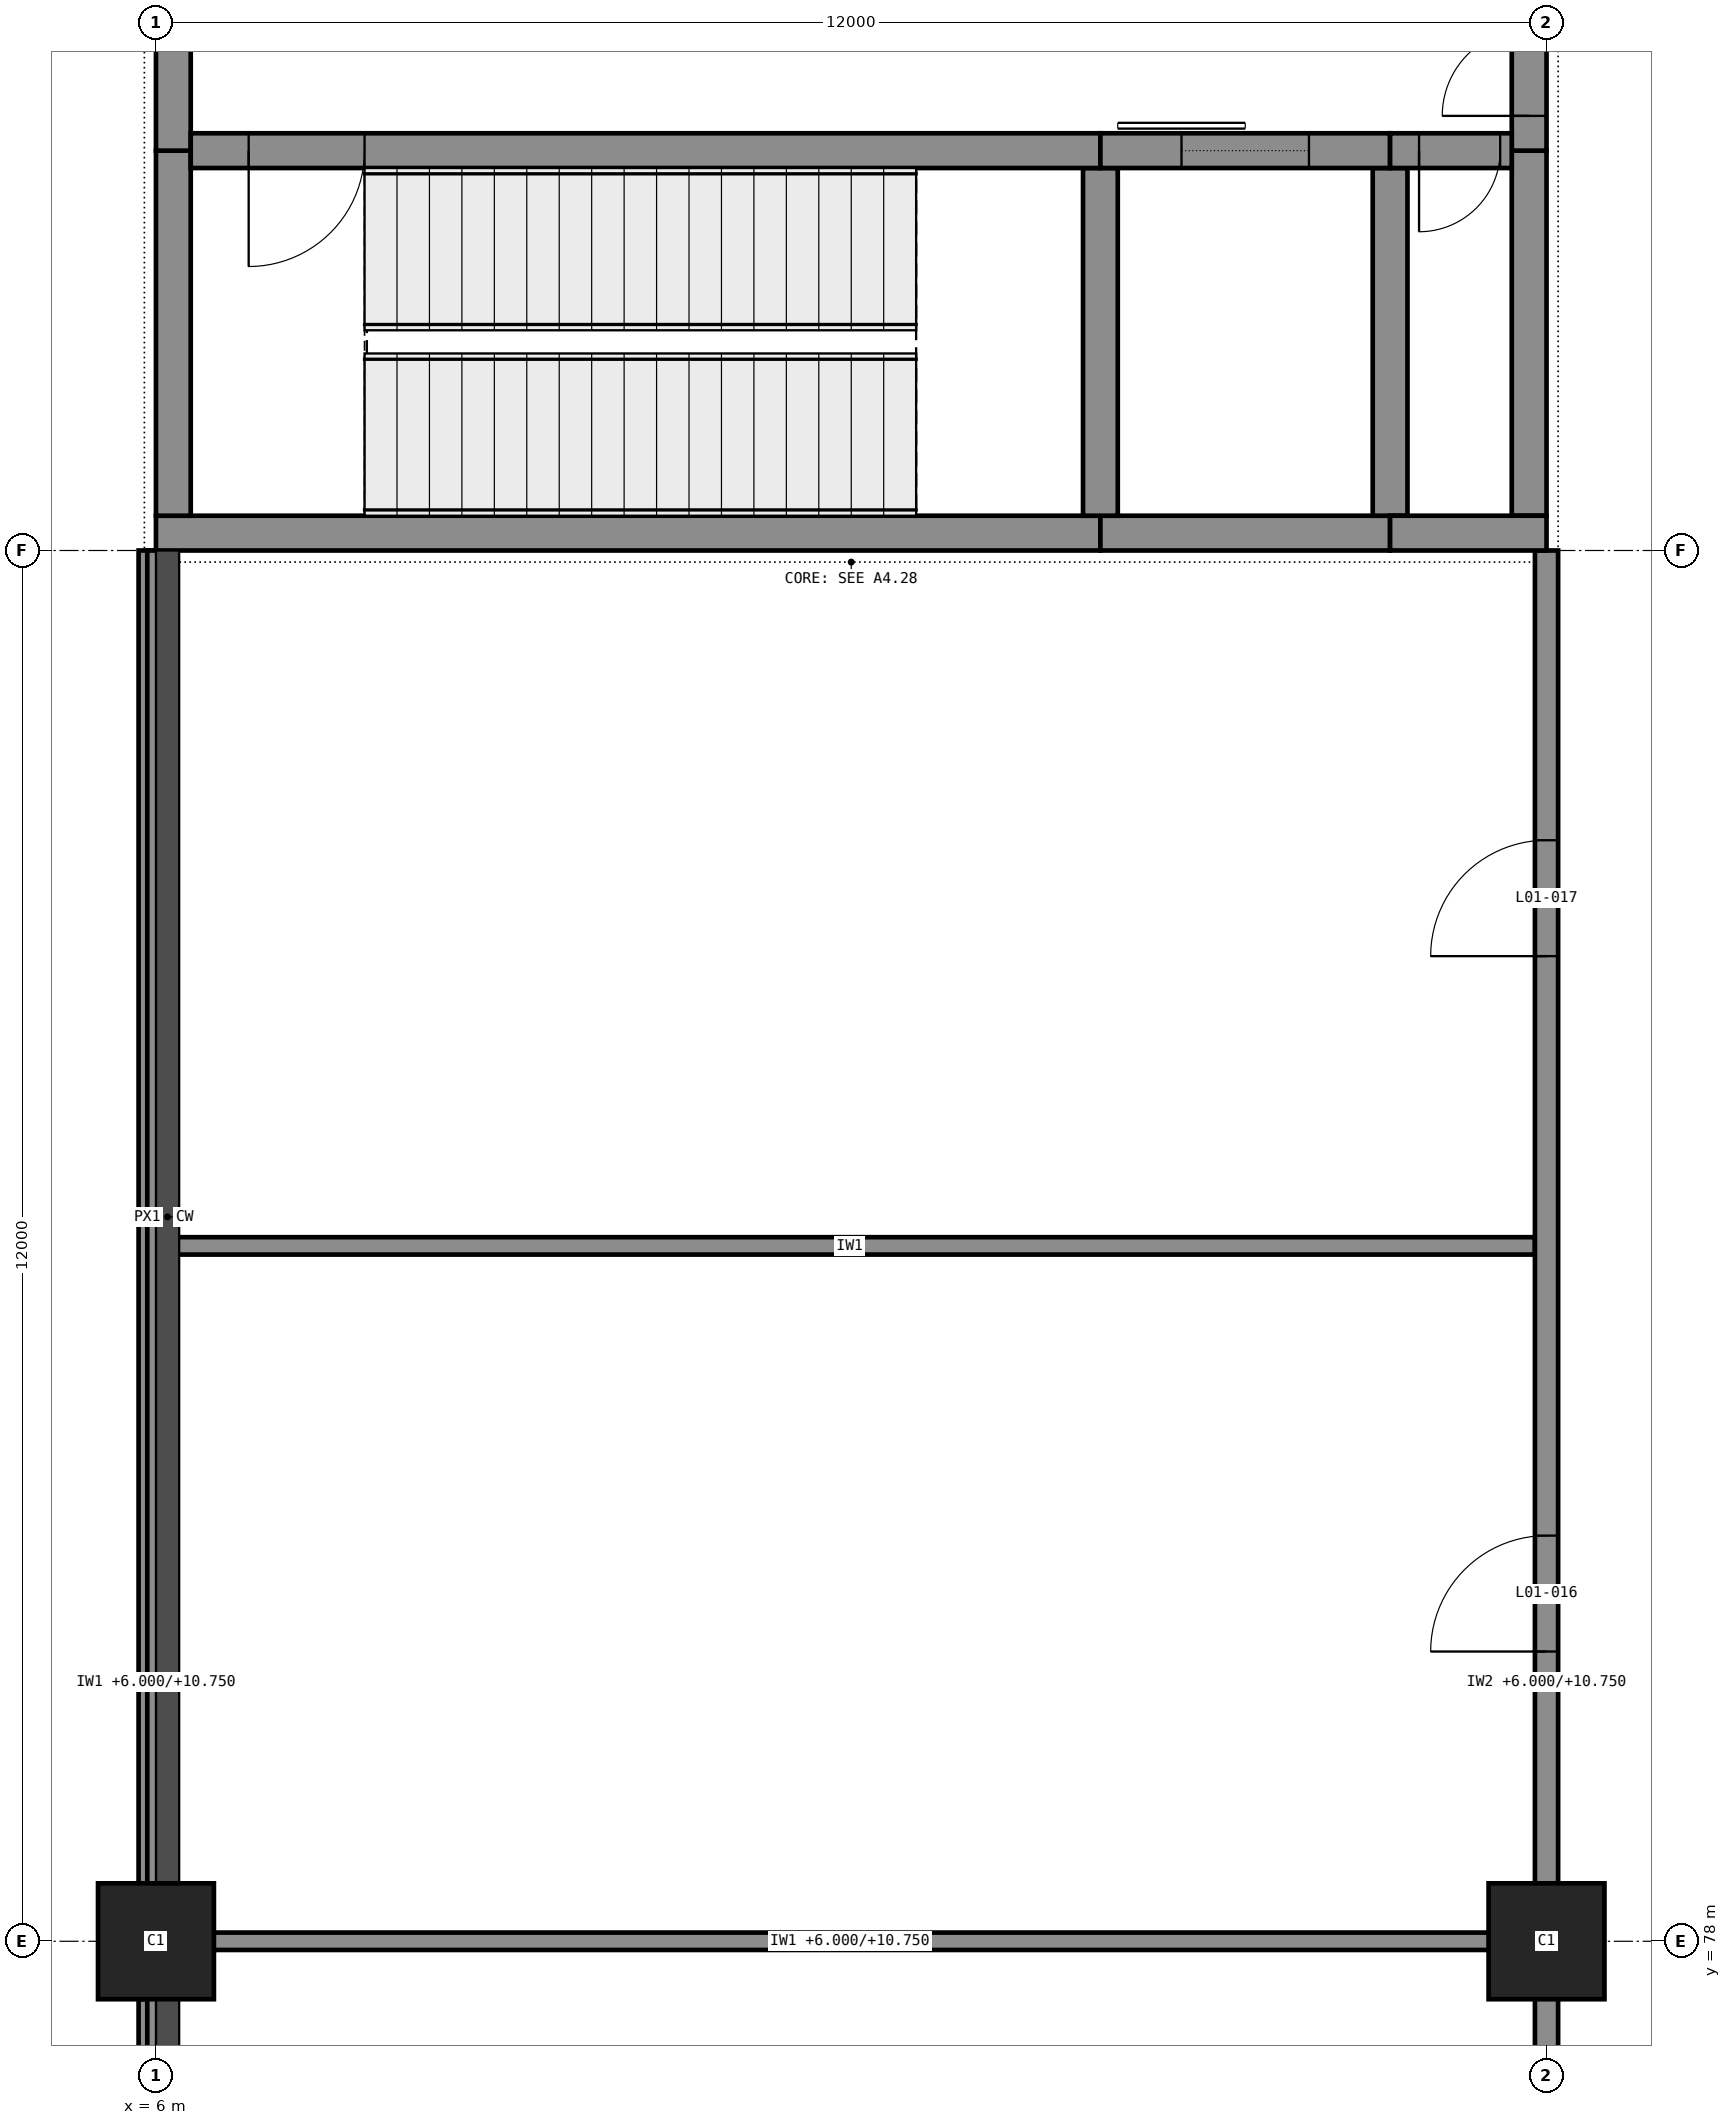
"""IFC4 building model, lengths in metres.
Left out: names, types, materials, properties, quantities, classifications, styles, units other than length and angle.
Written with IfcOpenShell. Run it as: python <this file> out.ifc"""

import sys

from ifc_helpers import new_model, si_unit, direction, frame, frame_2d, origin, origin_2d, place, context, subcontext, project, spatial, rectangle, extrude, element, fill, save


model = new_model("IFC4")
c1 = context("Model", 3, precision=1e-05, world=origin(), true_north=direction((0.0, 1.0)))
c2 = subcontext(c1, "Body", "Model", "MODEL_VIEW")
j1 = project(units=[si_unit("LENGTHUNIT", "METRE"), si_unit("PLANEANGLEUNIT", "RADIAN")], contexts=[c1])
p1 = place(None, origin())
s1 = spatial("IfcSite", under=j1, at=p1, CompositionType="ELEMENT")
p2 = place(p1, origin())
s2 = spatial("IfcBuilding", under=s1, at=p2, CompositionType="ELEMENT")
p3 = place(p2, frame((0.0, 0.0, 6.0)))
s3 = spatial("IfcBuildingStorey", under=s2, at=p3, CompositionType="ELEMENT", Elevation=6.0)
for number, where, z_axis, x_axis in (
    (1, (6.0, 78.0, 0.0), (0.0, 0.0, 1.0), (1.0, 0.0, 0.0)),
    (2, (18.0, 78.0, 0.0), (0.0, 0.0, 1.0), (1.0, 0.0, 0.0)),
):
    element("IfcColumn", number, at=place(p3, frame(where, z_axis=z_axis, x_axis=x_axis)), inside=s3, PredefinedType="COLUMN", context=c2, shape_type="SweptSolid", body=[
        extrude(rectangle(XDim=1.0, YDim=1.0, at=origin_2d()), origin(), (0.0, 0.0, 1.0), 6.0),
    ])
p4 = place(p3, frame((6.0, 90.15, 0.0), z_axis=(0.0, 0.0, 1.0), x_axis=(1.0, 0.0, 0.0)))
e3 = element("IfcWall", 3, at=p4, inside=s3, PredefinedType="SHEAR", context=c2, shape_type="SweptSolid", body=[
    extrude(rectangle(XDim=8.15, YDim=0.3, at=frame_2d((4.075, 0.0))), origin(), (0.0, 0.0, 1.0), 5.75),
])
p5 = place(p3, frame((14.15, 90.15, 0.0), z_axis=(0.0, 0.0, 1.0), x_axis=(1.0, 0.0, 0.0)))
e4 = element("IfcWall", 4, at=p5, inside=s3, PredefinedType="SHEAR", context=c2, shape_type="SweptSolid", body=[
    extrude(rectangle(XDim=2.5, YDim=0.3, at=frame_2d((1.25, 0.0))), origin(), (0.0, 0.0, 1.0), 5.75),
])
p6 = place(p3, frame((16.65, 90.15, 0.0), z_axis=(0.0, 0.0, 1.0), x_axis=(1.0, 0.0, 0.0)))
e5 = element("IfcWall", 5, at=p6, inside=s3, PredefinedType="SHEAR", context=c2, shape_type="SweptSolid", body=[
    extrude(rectangle(XDim=1.35, YDim=0.3, at=frame_2d((0.675, 0.0))), origin(), (0.0, 0.0, 1.0), 5.75),
])
p7 = place(p3, frame((6.3, 93.45, 0.0), z_axis=(0.0, 0.0, 1.0), x_axis=(1.0, 0.0, 0.0)))
e6 = element("IfcWall", 6, at=p7, inside=s3, PredefinedType="SHEAR", context=c2, shape_type="SweptSolid", body=[
    extrude(rectangle(XDim=7.85, YDim=0.3, at=frame_2d((3.925, 0.0))), origin(), (0.0, 0.0, 1.0), 5.75),
])
p8 = place(p7, frame((0.5, 0.0, 0.0)))
e7 = element("IfcOpeningElement", 7, at=p8, cuts=e6, PredefinedType="OPENING", context=c2, shape_type="SweptSolid", body=[
    extrude(rectangle(XDim=1.0, YDim=2.1, at=frame_2d((0.5, 1.05))), frame((0.0, 0.16, 0.0), z_axis=(0.0, -1.0, 0.0), x_axis=(1.0, 0.0, 0.0)), (0.0, 0.0, 1.0), 0.32),
])
p9 = place(p3, frame((14.15, 93.45, 0.0), z_axis=(0.0, 0.0, 1.0), x_axis=(1.0, 0.0, 0.0)))
e8 = element("IfcWall", 8, at=p9, inside=s3, PredefinedType="SHEAR", context=c2, shape_type="SweptSolid", body=[
    extrude(rectangle(XDim=2.5, YDim=0.3, at=frame_2d((1.25, 0.0))), origin(), (0.0, 0.0, 1.0), 5.75),
])
p10 = place(p9, frame((0.7, 0.0, 0.0)))
e9 = element("IfcOpeningElement", 9, at=p10, cuts=e8, PredefinedType="OPENING", context=c2, shape_type="SweptSolid", body=[
    extrude(rectangle(XDim=1.1, YDim=2.1, at=frame_2d((0.55, 1.05))), frame((0.0, 0.16, 0.0), z_axis=(0.0, -1.0, 0.0), x_axis=(1.0, 0.0, 0.0)), (0.0, 0.0, 1.0), 0.32),
])
p11 = place(p3, frame((16.65, 93.45, 0.0), z_axis=(0.0, 0.0, 1.0), x_axis=(1.0, 0.0, 0.0)))
e10 = element("IfcWall", 10, at=p11, inside=s3, PredefinedType="SHEAR", context=c2, shape_type="SweptSolid", body=[
    extrude(rectangle(XDim=1.05, YDim=0.3, at=frame_2d((0.525, 0.0))), origin(), (0.0, 0.0, 1.0), 5.75),
])
p12 = place(p11, frame((0.25, 0.0, 0.0)))
e11 = element("IfcOpeningElement", 11, at=p12, cuts=e10, PredefinedType="OPENING", context=c2, shape_type="SweptSolid", body=[
    extrude(rectangle(XDim=0.7, YDim=2.1, at=frame_2d((0.35, 1.05))), frame((0.0, 0.16, 0.0), z_axis=(0.0, -1.0, 0.0), x_axis=(1.0, 0.0, 0.0)), (0.0, 0.0, 1.0), 0.32),
])
p13 = place(p3, frame((6.15, 90.3, 0.0), z_axis=(0.0, 0.0, 1.0), x_axis=(0.0, 1.0, 0.0)))
e12 = element("IfcWall", 12, at=p13, inside=s3, PredefinedType="SHEAR", context=c2, shape_type="SweptSolid", body=[
    extrude(rectangle(XDim=3.15, YDim=0.3, at=frame_2d((1.575, 0.0))), origin(), (0.0, 0.0, 1.0), 5.75),
])
p14 = place(p3, frame((6.15, 93.45, 0.0), z_axis=(0.0, 0.0, 1.0), x_axis=(0.0, 1.0, 0.0)))
e13 = element("IfcWall", 13, at=p14, inside=s3, PredefinedType="SHEAR", context=c2, shape_type="SweptSolid", body=[
    extrude(rectangle(XDim=5.1, YDim=0.3, at=frame_2d((2.55, 0.0))), origin(), (0.0, 0.0, 1.0), 5.75),
])
p15 = place(p3, frame((17.85, 90.3, 0.0), z_axis=(0.0, 0.0, 1.0), x_axis=(0.0, 1.0, 0.0)))
e14 = element("IfcWall", 14, at=p15, inside=s3, PredefinedType="SHEAR", context=c2, shape_type="SweptSolid", body=[
    extrude(rectangle(XDim=3.15, YDim=0.3, at=frame_2d((1.575, 0.0))), origin(), (0.0, 0.0, 1.0), 5.75),
])
p16 = place(p3, frame((17.85, 93.45, 0.0), z_axis=(0.0, 0.0, 1.0), x_axis=(0.0, 1.0, 0.0)))
e15 = element("IfcWall", 15, at=p16, inside=s3, PredefinedType="SHEAR", context=c2, shape_type="SweptSolid", body=[
    extrude(rectangle(XDim=5.1, YDim=0.3, at=frame_2d((2.55, 0.0))), origin(), (0.0, 0.0, 1.0), 5.75),
])
p17 = place(p16, frame((0.3, 0.0, 0.0)))
e16 = element("IfcOpeningElement", 16, at=p17, cuts=e15, PredefinedType="OPENING", context=c2, shape_type="SweptSolid", body=[
    extrude(rectangle(XDim=1.5, YDim=2.1, at=frame_2d((0.75, 1.05))), frame((0.0, 0.16, 0.0), z_axis=(0.0, -1.0, 0.0), x_axis=(1.0, 0.0, 0.0)), (0.0, 0.0, 1.0), 0.32),
])
for number, where, z_axis, x_axis in (
    (17, (14.15, 90.3, 0.0), (0.0, 0.0, 1.0), (0.0, 1.0, 0.0)),
    (18, (16.65, 90.3, 0.0), (0.0, 0.0, 1.0), (0.0, 1.0, 0.0)),
):
    element("IfcWall", number, at=place(p3, frame(where, z_axis=z_axis, x_axis=x_axis)), inside=s3, PredefinedType="SHEAR", context=c2, shape_type="SweptSolid", body=[
        extrude(rectangle(XDim=3.0, YDim=0.3, at=frame_2d((1.5, 0.0))), origin(), (0.0, 0.0, 1.0), 5.75),
    ])
p18 = place(p3, frame((5.925, 90.0, 5.75), z_axis=(0.0, 0.0, 1.0), x_axis=(0.0, -1.0, 0.0)))
e19 = element("IfcWall", 19, at=p18, inside=s3, PredefinedType="STANDARD", context=c2, shape_type="SweptSolid", body=[
    extrude(rectangle(XDim=11.5, YDim=0.15, at=frame_2d((5.75, 0.0))), origin(), (0.0, 0.0, 1.0), 0.25),
])
p19 = place(p3, frame((5.925, 77.5, 5.75), z_axis=(0.0, 0.0, 1.0), x_axis=(0.0, -1.0, 0.0)))
e20 = element("IfcWall", 20, at=p19, inside=s3, PredefinedType="STANDARD", context=c2, shape_type="SweptSolid", body=[
    extrude(rectangle(XDim=11.0, YDim=0.15, at=frame_2d((5.5, 0.0))), origin(), (0.0, 0.0, 1.0), 0.25),
])
p20 = place(p3, frame((6.075, 78.0, 0.0), z_axis=(0.0, 0.0, 1.0), x_axis=(1.0, 0.0, 0.0)))
e21 = element("IfcWall", 21, at=p20, inside=s3, PredefinedType="PARTITIONING", context=c2, shape_type="SweptSolid", body=[
    extrude(rectangle(XDim=11.825, YDim=0.15, at=frame_2d((5.913, 0.0))), origin(), (0.0, 0.0, 1.0), 4.75),
])
p21 = place(p3, frame((6.075, 84.0, 0.0), z_axis=(0.0, 0.0, 1.0), x_axis=(1.0, 0.0, 0.0)))
e22 = element("IfcWall", 22, at=p21, inside=s3, PredefinedType="PARTITIONING", context=c2, shape_type="SweptSolid", body=[
    extrude(rectangle(XDim=11.825, YDim=0.15, at=frame_2d((5.913, 0.0))), origin(), (0.0, 0.0, 1.0), 5.75),
])
p22 = place(p3, frame((6.0, 66.1, 0.0), z_axis=(0.0, 0.0, 1.0), x_axis=(0.0, 1.0, 0.0)))
e23 = element("IfcWall", 23, at=p22, inside=s3, PredefinedType="PARTITIONING", context=c2, shape_type="SweptSolid", body=[
    extrude(rectangle(XDim=23.9, YDim=0.15, at=frame_2d((11.95, 0.0))), origin(), (0.0, 0.0, 1.0), 4.75),
])
p23 = place(p3, frame((18.0, 54.0, 0.0), z_axis=(0.0, 0.0, 1.0), x_axis=(0.0, 1.0, 0.0)))
e24 = element("IfcWall", 24, at=p23, inside=s3, PredefinedType="PARTITIONING", context=c2, shape_type="SweptSolid", body=[
    extrude(rectangle(XDim=36.0, YDim=0.2, at=frame_2d((18.0, 0.0))), origin(), (0.0, 0.0, 1.0), 4.75),
])
p24 = place(p23, frame((2.5, 0.0, 0.0)))
e25 = element("IfcOpeningElement", 25, at=p24, cuts=e24, PredefinedType="OPENING", context=c2, shape_type="SweptSolid", body=[
    extrude(rectangle(XDim=1.0, YDim=2.1, at=frame_2d((0.5, 1.05))), frame((0.0, 0.11, 0.0), z_axis=(0.0, -1.0, 0.0), x_axis=(1.0, 0.0, 0.0)), (0.0, 0.0, 1.0), 0.22),
])
p25 = place(p23, frame((7.2, 0.0, 0.0)))
e26 = element("IfcOpeningElement", 26, at=p25, cuts=e24, PredefinedType="OPENING", context=c2, shape_type="SweptSolid", body=[
    extrude(rectangle(XDim=1.2, YDim=2.1, at=frame_2d((0.6, 1.05))), frame((0.0, 0.11, 0.0), z_axis=(0.0, -1.0, 0.0), x_axis=(1.0, 0.0, 0.0)), (0.0, 0.0, 1.0), 0.22),
])
p26 = place(p23, frame((14.5, 0.0, 0.0)))
e27 = element("IfcOpeningElement", 27, at=p26, cuts=e24, PredefinedType="OPENING", context=c2, shape_type="SweptSolid", body=[
    extrude(rectangle(XDim=1.0, YDim=2.1, at=frame_2d((0.5, 1.05))), frame((0.0, 0.11, 0.0), z_axis=(0.0, -1.0, 0.0), x_axis=(1.0, 0.0, 0.0)), (0.0, 0.0, 1.0), 0.22),
])
p27 = place(p23, frame((20.5, 0.0, 0.0)))
e28 = element("IfcOpeningElement", 28, at=p27, cuts=e24, PredefinedType="OPENING", context=c2, shape_type="SweptSolid", body=[
    extrude(rectangle(XDim=1.0, YDim=2.1, at=frame_2d((0.5, 1.05))), frame((0.0, 0.11, 0.0), z_axis=(0.0, -1.0, 0.0), x_axis=(1.0, 0.0, 0.0)), (0.0, 0.0, 1.0), 0.22),
])
p28 = place(p23, frame((26.5, 0.0, 0.0)))
e29 = element("IfcOpeningElement", 29, at=p28, cuts=e24, PredefinedType="OPENING", context=c2, shape_type="SweptSolid", body=[
    extrude(rectangle(XDim=1.0, YDim=2.1, at=frame_2d((0.5, 1.05))), frame((0.0, 0.11, 0.0), z_axis=(0.0, -1.0, 0.0), x_axis=(1.0, 0.0, 0.0)), (0.0, 0.0, 1.0), 0.22),
])
p29 = place(p23, frame((32.5, 0.0, 0.0)))
e30 = element("IfcOpeningElement", 30, at=p29, cuts=e24, PredefinedType="OPENING", context=c2, shape_type="SweptSolid", body=[
    extrude(rectangle(XDim=1.0, YDim=2.1, at=frame_2d((0.5, 1.05))), frame((0.0, 0.11, 0.0), z_axis=(0.0, -1.0, 0.0), x_axis=(1.0, 0.0, 0.0)), (0.0, 0.0, 1.0), 0.22),
])
p30 = place(p28, origin())
e31 = element("IfcDoor", 31, at=p30, inside=s3, OperationType="SINGLE_SWING_RIGHT", PredefinedType="DOOR", context=c2, shape_type="SweptSolid", body=[
    extrude(rectangle(XDim=1.0, YDim=2.1, at=frame_2d((0.5, 1.05))), frame((0.0, 0.025, 0.0), z_axis=(0.0, -1.0, 0.0), x_axis=(1.0, 0.0, 0.0)), (0.0, 0.0, 1.0), 0.05),
])
fill(e29, e31)
p31 = place(p29, origin())
e32 = element("IfcDoor", 32, at=p31, inside=s3, OperationType="SINGLE_SWING_RIGHT", PredefinedType="DOOR", context=c2, shape_type="SweptSolid", body=[
    extrude(rectangle(XDim=1.0, YDim=2.1, at=frame_2d((0.5, 1.05))), frame((0.0, 0.025, 0.0), z_axis=(0.0, -1.0, 0.0), x_axis=(1.0, 0.0, 0.0)), (0.0, 0.0, 1.0), 0.05),
])
fill(e30, e32)
p32 = place(p8, frame((1.0, 0.0, 0.0), z_axis=(0.0, 0.0, 1.0), x_axis=(-1.0, 0.0, 0.0)))
e33 = element("IfcDoor", 33, at=p32, inside=s3, OperationType="SINGLE_SWING_LEFT", PredefinedType="DOOR", context=c2, shape_type="SweptSolid", body=[
    extrude(rectangle(XDim=1.0, YDim=2.1, at=frame_2d((0.5, 1.05))), frame((0.0, 0.025, 0.0), z_axis=(0.0, -1.0, 0.0), x_axis=(1.0, 0.0, 0.0)), (0.0, 0.0, 1.0), 0.05),
])
fill(e7, e33)
p33 = place(p10, origin())
e34 = element("IfcDoor", 34, at=p33, inside=s3, OperationType="SLIDING_TO_LEFT", PredefinedType="DOOR", context=c2, shape_type="SweptSolid", body=[
    extrude(rectangle(XDim=1.1, YDim=2.1, at=frame_2d((0.55, 1.05))), frame((0.0, 0.025, 0.0), z_axis=(0.0, -1.0, 0.0), x_axis=(1.0, 0.0, 0.0)), (0.0, 0.0, 1.0), 0.05),
])
fill(e9, e34)
p34 = place(p12, frame((0.7, 0.0, 0.0), z_axis=(0.0, 0.0, 1.0), x_axis=(-1.0, 0.0, 0.0)))
e35 = element("IfcDoor", 35, at=p34, inside=s3, OperationType="SINGLE_SWING_LEFT", PredefinedType="DOOR", context=c2, shape_type="SweptSolid", body=[
    extrude(rectangle(XDim=0.7, YDim=2.1, at=frame_2d((0.35, 1.05))), frame((0.0, 0.025, 0.0), z_axis=(0.0, -1.0, 0.0), x_axis=(1.0, 0.0, 0.0)), (0.0, 0.0, 1.0), 0.05),
])
fill(e11, e35)
p35 = place(p17, origin())
e36 = element("IfcDoor", 36, at=p35, inside=s3, OperationType="DOUBLE_DOOR_SINGLE_SWING", PredefinedType="DOOR", context=c2, shape_type="SweptSolid", body=[
    extrude(rectangle(XDim=1.5, YDim=2.1, at=frame_2d((0.75, 1.05))), frame((0.0, 0.025, 0.0), z_axis=(0.0, -1.0, 0.0), x_axis=(1.0, 0.0, 0.0)), (0.0, 0.0, 1.0), 0.05),
])
fill(e16, e36)
save(model, sys.argv[1])
